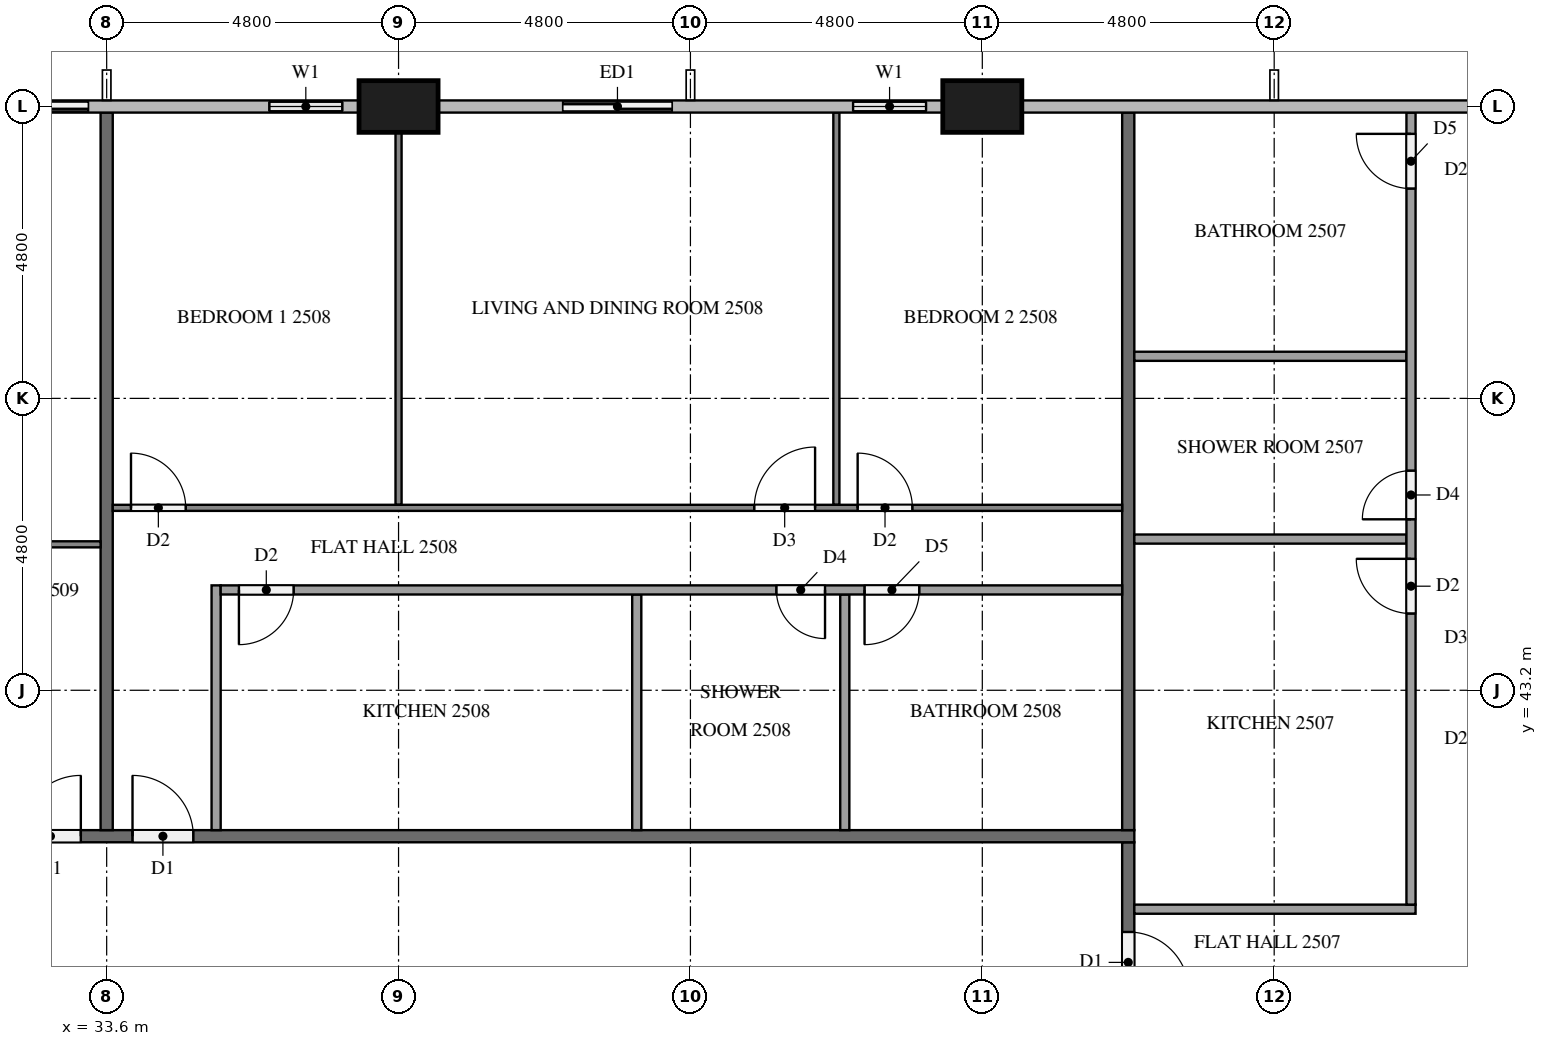
"""IFC4 building model, lengths in metres.
Left out: names, types, materials, properties, quantities, classifications, styles, units other than length and angle.
Written with IfcOpenShell. Run it as: python <this file> out.ifc"""

import sys

from ifc_helpers import new_model, si_unit, direction, frame, frame_2d, origin, origin_2d, place, context, subcontext, project, spatial, rectangle, extrude, element, fill, save


model = new_model("IFC4")
c1 = context("Model", 3, precision=1e-05, world=origin(), true_north=direction((0.0, 1.0)))
c2 = subcontext(c1, "Body", "Model", "MODEL_VIEW")
j1 = project(units=[si_unit("LENGTHUNIT", "METRE"), si_unit("PLANEANGLEUNIT", "RADIAN")], contexts=[c1])
p1 = place(None, origin())
s1 = spatial("IfcSite", under=j1, at=p1, CompositionType="ELEMENT")
p2 = place(p1, origin())
s2 = spatial("IfcBuilding", under=s1, at=p2, CompositionType="ELEMENT")
p3 = place(p2, frame((0.0, 0.0, 99.7)))
s3 = spatial("IfcBuildingStorey", under=s2, at=p3, CompositionType="ELEMENT", Elevation=99.7)
for number, where, z_axis, x_axis in (
    (1, (48.0, 52.8, 0.0), (0.0, 0.0, 1.0), (1.0, 0.0, 0.0)),
    (2, (38.4, 52.8, 0.0), (0.0, 0.0, 1.0), (1.0, 0.0, 0.0)),
):
    element("IfcColumn", number, at=place(p3, frame(where, z_axis=z_axis, x_axis=x_axis)), inside=s3, PredefinedType="COLUMN", context=c2, shape_type="SweptSolid", body=[
        extrude(rectangle(XDim=1.3, YDim=0.85, at=origin_2d()), origin(), (0.0, 0.0, 1.0), 3.2),
    ])
p4 = place(p3, frame((47.35, 52.8, 0.0), z_axis=(0.0, 0.0, 1.0), x_axis=(-1.0, 0.0, 0.0)))
e3 = element("IfcWall", 3, at=p4, inside=s3, PredefinedType="SOLIDWALL", context=c2, shape_type="SweptSolid", body=[
    extrude(rectangle(XDim=1.75, YDim=0.15, at=frame_2d((0.875, 0.0))), origin(), (0.0, 0.0, 1.0), 3.2),
])
p5 = place(p4, frame((0.275, 0.0, 0.9)))
e4 = element("IfcOpeningElement", 4, at=p5, cuts=e3, PredefinedType="OPENING", context=c2, shape_type="SweptSolid", body=[
    extrude(rectangle(XDim=1.2, YDim=1.4, at=frame_2d((0.6, 0.7))), frame((0.0, 0.085, 0.0), z_axis=(0.0, -1.0, 0.0), x_axis=(1.0, 0.0, 0.0)), (0.0, 0.0, 1.0), 0.17),
])
p6 = place(p3, frame((43.2, 52.8, 0.0), z_axis=(0.0, 0.0, 1.0), x_axis=(-1.0, 0.0, 0.0)))
e5 = element("IfcWall", 5, at=p6, inside=s3, PredefinedType="SOLIDWALL", context=c2, shape_type="SweptSolid", body=[
    extrude(rectangle(XDim=2.4, YDim=0.15, at=frame_2d((1.2, 0.0))), origin(), (0.0, 0.0, 1.0), 3.2),
])
p7 = place(p6, frame((0.3, 0.0, 0.0)))
e6 = element("IfcOpeningElement", 6, at=p7, cuts=e5, PredefinedType="OPENING", context=c2, shape_type="SweptSolid", body=[
    extrude(rectangle(XDim=1.8, YDim=2.4, at=frame_2d((0.9, 1.2))), frame((0.0, 0.085, 0.0), z_axis=(0.0, -1.0, 0.0), x_axis=(1.0, 0.0, 0.0)), (0.0, 0.0, 1.0), 0.17),
])
p8 = place(p3, frame((37.75, 52.8, 0.0), z_axis=(0.0, 0.0, 1.0), x_axis=(-1.0, 0.0, 0.0)))
e7 = element("IfcWall", 7, at=p8, inside=s3, PredefinedType="SOLIDWALL", context=c2, shape_type="SweptSolid", body=[
    extrude(rectangle(XDim=1.75, YDim=0.15, at=frame_2d((0.875, 0.0))), origin(), (0.0, 0.0, 1.0), 3.2),
])
p9 = place(p8, frame((0.275, 0.0, 0.9)))
e8 = element("IfcOpeningElement", 8, at=p9, cuts=e7, PredefinedType="OPENING", context=c2, shape_type="SweptSolid", body=[
    extrude(rectangle(XDim=1.2, YDim=1.4, at=frame_2d((0.6, 0.7))), frame((0.0, 0.085, 0.0), z_axis=(0.0, -1.0, 0.0), x_axis=(1.0, 0.0, 0.0)), (0.0, 0.0, 1.0), 0.17),
])
p10 = place(p3, frame((33.6, 52.8, 0.0), z_axis=(0.0, 0.0, 1.0), x_axis=(-1.0, 0.0, 0.0)))
e9 = element("IfcWall", 9, at=p10, inside=s3, PredefinedType="SOLIDWALL", context=c2, shape_type="SweptSolid", body=[
    extrude(rectangle(XDim=2.4, YDim=0.15, at=frame_2d((1.2, 0.0))), origin(), (0.0, 0.0, 1.0), 3.2),
])
p11 = place(p10, frame((0.3, 0.0, 0.0)))
e10 = element("IfcOpeningElement", 10, at=p11, cuts=e9, PredefinedType="OPENING", context=c2, shape_type="SweptSolid", body=[
    extrude(rectangle(XDim=1.8, YDim=2.4, at=frame_2d((0.9, 1.2))), frame((0.0, 0.085, 0.0), z_axis=(0.0, -1.0, 0.0), x_axis=(1.0, 0.0, 0.0)), (0.0, 0.0, 1.0), 0.17),
])
p12 = place(p3, frame((50.4, 40.7, 0.0), z_axis=(0.0, 0.0, 1.0), x_axis=(0.0, -1.0, 0.0)))
e11 = element("IfcWall", 11, at=p12, inside=s3, PredefinedType="PARTITIONING", context=c2, shape_type="SweptSolid", body=[
    extrude(rectangle(XDim=2.8, YDim=0.2, at=frame_2d((1.4, 0.0))), origin(), (0.0, 0.0, 1.0), 3.2),
])
p13 = place(p12, frame((1.475, 0.0, 0.0)))
e12 = element("IfcOpeningElement", 12, at=p13, cuts=e11, PredefinedType="OPENING", context=c2, shape_type="SweptSolid", body=[
    extrude(rectangle(XDim=1.0, YDim=2.1, at=frame_2d((0.5, 1.05))), frame((0.0, 0.11, 0.0), z_axis=(0.0, -1.0, 0.0), x_axis=(1.0, 0.0, 0.0)), (0.0, 0.0, 1.0), 0.22),
])
p14 = place(p3, frame((11.9, 40.8, 0.0), z_axis=(0.0, 0.0, 1.0), x_axis=(1.0, 0.0, 0.0)))
e13 = element("IfcWall", 13, at=p14, inside=s3, PredefinedType="PARTITIONING", context=c2, shape_type="SweptSolid", body=[
    extrude(rectangle(XDim=38.6, YDim=0.2, at=frame_2d((19.3, 0.0))), origin(), (0.0, 0.0, 1.0), 3.2),
])
p15 = place(p14, frame((22.125, 0.0, 0.0)))
e14 = element("IfcOpeningElement", 14, at=p15, cuts=e13, PredefinedType="OPENING", context=c2, shape_type="SweptSolid", body=[
    extrude(rectangle(XDim=1.0, YDim=2.1, at=frame_2d((0.5, 1.05))), frame((0.0, 0.11, 0.0), z_axis=(0.0, -1.0, 0.0), x_axis=(1.0, 0.0, 0.0)), (0.0, 0.0, 1.0), 0.22),
])
p16 = place(p14, frame((20.275, 0.0, 0.0)))
e15 = element("IfcOpeningElement", 15, at=p16, cuts=e13, PredefinedType="OPENING", context=c2, shape_type="SweptSolid", body=[
    extrude(rectangle(XDim=1.0, YDim=2.1, at=frame_2d((0.5, 1.05))), frame((0.0, 0.11, 0.0), z_axis=(0.0, -1.0, 0.0), x_axis=(1.0, 0.0, 0.0)), (0.0, 0.0, 1.0), 0.22),
])
p17 = place(p14, frame((0.525, 0.0, 0.0)))
e16 = element("IfcOpeningElement", 16, at=p17, cuts=e13, PredefinedType="OPENING", context=c2, shape_type="SweptSolid", body=[
    extrude(rectangle(XDim=1.0, YDim=2.1, at=frame_2d((0.5, 1.05))), frame((0.0, 0.11, 0.0), z_axis=(0.0, -1.0, 0.0), x_axis=(1.0, 0.0, 0.0)), (0.0, 0.0, 1.0), 0.22),
])
for number, where, z_axis, x_axis in (
    (17, (50.4, 40.9, 0.0), (0.0, 0.0, 1.0), (0.0, 1.0, 0.0)),
    (18, (33.6, 52.7, 0.0), (0.0, 0.0, 1.0), (0.0, -1.0, 0.0)),
):
    element("IfcWall", number, at=place(p3, frame(where, z_axis=z_axis, x_axis=x_axis)), inside=s3, PredefinedType="PARTITIONING", context=c2, shape_type="SweptSolid", body=[
        extrude(rectangle(XDim=11.8, YDim=0.2, at=frame_2d((5.9, 0.0))), origin(), (0.0, 0.0, 1.0), 3.2),
    ])
for number, where, z_axis, x_axis in (
    (19, (50.5, 45.687, 0.0), (0.0, 0.0, 1.0), (1.0, 0.0, 0.0)),
    (20, (50.5, 48.692, 0.0), (0.0, 0.0, 1.0), (1.0, 0.0, 0.0)),
):
    element("IfcWall", number, at=place(p3, frame(where, z_axis=z_axis, x_axis=x_axis)), inside=s3, PredefinedType="PARTITIONING", context=c2, shape_type="SweptSolid", body=[
        extrude(rectangle(XDim=4.475, YDim=0.15, at=frame_2d((2.238, 0.0))), origin(), (0.0, 0.0, 1.0), 3.2),
    ])
p18 = place(p3, frame((50.5, 39.6, 0.0), z_axis=(0.0, 0.0, 1.0), x_axis=(1.0, 0.0, 0.0)))
e21 = element("IfcWall", 21, at=p18, inside=s3, PredefinedType="PARTITIONING", context=c2, shape_type="SweptSolid", body=[
    extrude(rectangle(XDim=4.625, YDim=0.15, at=frame_2d((2.312, 0.0))), origin(), (0.0, 0.0, 1.0), 3.2),
])
p19 = place(p3, frame((55.05, 39.675, 0.0), z_axis=(0.0, 0.0, 1.0), x_axis=(0.0, 1.0, 0.0)))
e22 = element("IfcWall", 22, at=p19, inside=s3, PredefinedType="PARTITIONING", context=c2, shape_type="SweptSolid", body=[
    extrude(rectangle(XDim=13.025, YDim=0.15, at=frame_2d((6.512, 0.0))), origin(), (0.0, 0.0, 1.0), 3.2),
])
p20 = place(p19, frame((4.787, 0.0, 0.0)))
e23 = element("IfcOpeningElement", 23, at=p20, cuts=e22, PredefinedType="OPENING", context=c2, shape_type="SweptSolid", body=[
    extrude(rectangle(XDim=0.9, YDim=2.1, at=frame_2d((0.45, 1.05))), frame((0.0, 0.085, 0.0), z_axis=(0.0, -1.0, 0.0), x_axis=(1.0, 0.0, 0.0)), (0.0, 0.0, 1.0), 0.17),
])
p21 = place(p19, frame((6.336, 0.0, 0.0)))
e24 = element("IfcOpeningElement", 24, at=p21, cuts=e22, PredefinedType="OPENING", context=c2, shape_type="SweptSolid", body=[
    extrude(rectangle(XDim=0.8, YDim=2.1, at=frame_2d((0.4, 1.05))), frame((0.0, 0.085, 0.0), z_axis=(0.0, -1.0, 0.0), x_axis=(1.0, 0.0, 0.0)), (0.0, 0.0, 1.0), 0.17),
])
p22 = place(p19, frame((11.775, 0.0, 0.0)))
e25 = element("IfcOpeningElement", 25, at=p22, cuts=e22, PredefinedType="OPENING", context=c2, shape_type="SweptSolid", body=[
    extrude(rectangle(XDim=0.9, YDim=2.1, at=frame_2d((0.45, 1.05))), frame((0.0, 0.085, 0.0), z_axis=(0.0, -1.0, 0.0), x_axis=(1.0, 0.0, 0.0)), (0.0, 0.0, 1.0), 0.17),
])
p23 = place(p3, frame((38.4, 46.25, 0.0), z_axis=(0.0, 0.0, 1.0), x_axis=(0.0, 1.0, 0.0)))
e26 = element("IfcWall", 26, at=p23, inside=s3, PredefinedType="PARTITIONING", context=c2, shape_type="SweptSolid", body=[
    extrude(rectangle(XDim=6.125, YDim=0.1, at=frame_2d((3.062, 0.0))), origin(), (0.0, 0.0, 1.0), 3.2),
])
p24 = place(p3, frame((45.6, 46.25, 0.0), z_axis=(0.0, 0.0, 1.0), x_axis=(0.0, 1.0, 0.0)))
e27 = element("IfcWall", 27, at=p24, inside=s3, PredefinedType="PARTITIONING", context=c2, shape_type="SweptSolid", body=[
    extrude(rectangle(XDim=6.45, YDim=0.1, at=frame_2d((3.225, 0.0))), origin(), (0.0, 0.0, 1.0), 3.2),
])
p25 = place(p3, frame((33.7, 46.2, 0.0), z_axis=(0.0, 0.0, 1.0), x_axis=(1.0, 0.0, 0.0)))
e28 = element("IfcWall", 28, at=p25, inside=s3, PredefinedType="PARTITIONING", context=c2, shape_type="SweptSolid", body=[
    extrude(rectangle(XDim=16.6, YDim=0.1, at=frame_2d((8.3, 0.0))), origin(), (0.0, 0.0, 1.0), 3.2),
])
p26 = place(p25, frame((0.3, 0.0, 0.0)))
e29 = element("IfcOpeningElement", 29, at=p26, cuts=e28, PredefinedType="OPENING", context=c2, shape_type="SweptSolid", body=[
    extrude(rectangle(XDim=0.9, YDim=2.1, at=frame_2d((0.45, 1.05))), frame((0.0, 0.06, 0.0), z_axis=(0.0, -1.0, 0.0), x_axis=(1.0, 0.0, 0.0)), (0.0, 0.0, 1.0), 0.12),
])
p27 = place(p25, frame((10.55, 0.0, 0.0)))
e30 = element("IfcOpeningElement", 30, at=p27, cuts=e28, PredefinedType="OPENING", context=c2, shape_type="SweptSolid", body=[
    extrude(rectangle(XDim=1.0, YDim=2.1, at=frame_2d((0.5, 1.05))), frame((0.0, 0.06, 0.0), z_axis=(0.0, -1.0, 0.0), x_axis=(1.0, 0.0, 0.0)), (0.0, 0.0, 1.0), 0.12),
])
p28 = place(p25, frame((12.25, 0.0, 0.0)))
e31 = element("IfcOpeningElement", 31, at=p28, cuts=e28, PredefinedType="OPENING", context=c2, shape_type="SweptSolid", body=[
    extrude(rectangle(XDim=0.9, YDim=2.1, at=frame_2d((0.45, 1.05))), frame((0.0, 0.06, 0.0), z_axis=(0.0, -1.0, 0.0), x_axis=(1.0, 0.0, 0.0)), (0.0, 0.0, 1.0), 0.12),
])
for number, where, z_axis, x_axis in (
    (32, (42.317, 40.9, 0.0), (0.0, 0.0, 1.0), (0.0, 1.0, 0.0)),
    (33, (45.739, 40.9, 0.0), (0.0, 0.0, 1.0), (0.0, 1.0, 0.0)),
):
    element("IfcWall", number, at=place(p3, frame(where, z_axis=z_axis, x_axis=x_axis)), inside=s3, PredefinedType="PARTITIONING", context=c2, shape_type="SweptSolid", body=[
        extrude(rectangle(XDim=3.875, YDim=0.15, at=frame_2d((1.938, 0.0))), origin(), (0.0, 0.0, 1.0), 3.2),
    ])
p29 = place(p3, frame((35.4, 40.9, 0.0), z_axis=(0.0, 0.0, 1.0), x_axis=(0.0, 1.0, 0.0)))
e34 = element("IfcWall", 34, at=p29, inside=s3, PredefinedType="PARTITIONING", context=c2, shape_type="SweptSolid", body=[
    extrude(rectangle(XDim=4.025, YDim=0.15, at=frame_2d((2.013, 0.0))), origin(), (0.0, 0.0, 1.0), 3.2),
])
p30 = place(p3, frame((50.3, 44.85, 0.0), z_axis=(0.0, 0.0, 1.0), x_axis=(-1.0, 0.0, 0.0)))
e35 = element("IfcWall", 35, at=p30, inside=s3, PredefinedType="PARTITIONING", context=c2, shape_type="SweptSolid", body=[
    extrude(rectangle(XDim=14.825, YDim=0.15, at=frame_2d((7.413, 0.0))), origin(), (0.0, 0.0, 1.0), 3.2),
])
p31 = place(p30, frame((13.625, 0.0, 0.0)))
e36 = element("IfcOpeningElement", 36, at=p31, cuts=e35, PredefinedType="OPENING", context=c2, shape_type="SweptSolid", body=[
    extrude(rectangle(XDim=0.9, YDim=2.1, at=frame_2d((0.45, 1.05))), frame((0.0, 0.085, 0.0), z_axis=(0.0, -1.0, 0.0), x_axis=(1.0, 0.0, 0.0)), (0.0, 0.0, 1.0), 0.17),
])
p32 = place(p30, frame((4.886, 0.0, 0.0)))
e37 = element("IfcOpeningElement", 37, at=p32, cuts=e35, PredefinedType="OPENING", context=c2, shape_type="SweptSolid", body=[
    extrude(rectangle(XDim=0.8, YDim=2.1, at=frame_2d((0.4, 1.05))), frame((0.0, 0.085, 0.0), z_axis=(0.0, -1.0, 0.0), x_axis=(1.0, 0.0, 0.0)), (0.0, 0.0, 1.0), 0.17),
])
p33 = place(p30, frame((3.336, 0.0, 0.0)))
e38 = element("IfcOpeningElement", 38, at=p33, cuts=e35, PredefinedType="OPENING", context=c2, shape_type="SweptSolid", body=[
    extrude(rectangle(XDim=0.9, YDim=2.1, at=frame_2d((0.45, 1.05))), frame((0.0, 0.085, 0.0), z_axis=(0.0, -1.0, 0.0), x_axis=(1.0, 0.0, 0.0)), (0.0, 0.0, 1.0), 0.17),
])
p34 = place(p3, frame((21.7, 45.6, 0.0), z_axis=(0.0, 0.0, 1.0), x_axis=(1.0, 0.0, 0.0)))
e39 = element("IfcWall", 39, at=p34, inside=s3, PredefinedType="PARTITIONING", context=c2, shape_type="SweptSolid", body=[
    extrude(rectangle(XDim=11.8, YDim=0.1, at=frame_2d((5.9, 0.0))), origin(), (0.0, 0.0, 1.0), 3.2),
])
p35 = place(p34, frame((5.05, 0.0, 0.0)))
e40 = element("IfcOpeningElement", 40, at=p35, cuts=e39, PredefinedType="OPENING", context=c2, shape_type="SweptSolid", body=[
    extrude(rectangle(XDim=1.0, YDim=2.1, at=frame_2d((0.5, 1.05))), frame((0.0, 0.06, 0.0), z_axis=(0.0, -1.0, 0.0), x_axis=(1.0, 0.0, 0.0)), (0.0, 0.0, 1.0), 0.12),
])
p36 = place(p34, frame((3.45, 0.0, 0.0)))
e41 = element("IfcOpeningElement", 41, at=p36, cuts=e39, PredefinedType="OPENING", context=c2, shape_type="SweptSolid", body=[
    extrude(rectangle(XDim=0.9, YDim=2.1, at=frame_2d((0.45, 1.05))), frame((0.0, 0.06, 0.0), z_axis=(0.0, -1.0, 0.0), x_axis=(1.0, 0.0, 0.0)), (0.0, 0.0, 1.0), 0.12),
])
p37 = place(p5, origin())
e42 = element("IfcWindow", 42, at=p37, inside=s3, PartitioningType="SINGLE_PANEL", PredefinedType="WINDOW", context=c2, shape_type="SweptSolid", body=[
    extrude(rectangle(XDim=1.2, YDim=1.4, at=frame_2d((0.6, 0.7))), frame((0.0, 0.03, 0.0), z_axis=(0.0, -1.0, 0.0), x_axis=(1.0, 0.0, 0.0)), (0.0, 0.0, 1.0), 0.06),
])
fill(e4, e42)
p38 = place(p7, origin())
e43 = element("IfcDoor", 43, at=p38, inside=s3, OperationType="SLIDING_TO_RIGHT", PredefinedType="DOOR", context=c2, shape_type="SweptSolid", body=[
    extrude(rectangle(XDim=1.8, YDim=2.4, at=frame_2d((0.9, 1.2))), frame((0.0, 0.025, 0.0), z_axis=(0.0, -1.0, 0.0), x_axis=(1.0, 0.0, 0.0)), (0.0, 0.0, 1.0), 0.05),
])
fill(e6, e43)
p39 = place(p9, origin())
e44 = element("IfcWindow", 44, at=p39, inside=s3, PartitioningType="SINGLE_PANEL", PredefinedType="WINDOW", context=c2, shape_type="SweptSolid", body=[
    extrude(rectangle(XDim=1.2, YDim=1.4, at=frame_2d((0.6, 0.7))), frame((0.0, 0.03, 0.0), z_axis=(0.0, -1.0, 0.0), x_axis=(1.0, 0.0, 0.0)), (0.0, 0.0, 1.0), 0.06),
])
fill(e8, e44)
p40 = place(p11, origin())
e45 = element("IfcDoor", 45, at=p40, inside=s3, OperationType="SLIDING_TO_LEFT", PredefinedType="DOOR", context=c2, shape_type="SweptSolid", body=[
    extrude(rectangle(XDim=1.8, YDim=2.4, at=frame_2d((0.9, 1.2))), frame((0.0, 0.025, 0.0), z_axis=(0.0, -1.0, 0.0), x_axis=(1.0, 0.0, 0.0)), (0.0, 0.0, 1.0), 0.05),
])
fill(e10, e45)
p41 = place(p13, origin())
e46 = element("IfcDoor", 46, at=p41, inside=s3, OperationType="SINGLE_SWING_RIGHT", PredefinedType="DOOR", context=c2, shape_type="SweptSolid", body=[
    extrude(rectangle(XDim=1.0, YDim=2.1, at=frame_2d((0.5, 1.05))), frame((0.0, 0.025, 0.0), z_axis=(0.0, -1.0, 0.0), x_axis=(1.0, 0.0, 0.0)), (0.0, 0.0, 1.0), 0.05),
])
fill(e12, e46)
p42 = place(p15, origin())
e47 = element("IfcDoor", 47, at=p42, inside=s3, OperationType="SINGLE_SWING_LEFT", PredefinedType="DOOR", context=c2, shape_type="SweptSolid", body=[
    extrude(rectangle(XDim=1.0, YDim=2.1, at=frame_2d((0.5, 1.05))), frame((0.0, 0.025, 0.0), z_axis=(0.0, -1.0, 0.0), x_axis=(1.0, 0.0, 0.0)), (0.0, 0.0, 1.0), 0.05),
])
fill(e14, e47)
p43 = place(p16, origin())
e48 = element("IfcDoor", 48, at=p43, inside=s3, OperationType="SINGLE_SWING_RIGHT", PredefinedType="DOOR", context=c2, shape_type="SweptSolid", body=[
    extrude(rectangle(XDim=1.0, YDim=2.1, at=frame_2d((0.5, 1.05))), frame((0.0, 0.025, 0.0), z_axis=(0.0, -1.0, 0.0), x_axis=(1.0, 0.0, 0.0)), (0.0, 0.0, 1.0), 0.05),
])
fill(e15, e48)
p44 = place(p20, origin())
e49 = element("IfcDoor", 49, at=p44, inside=s3, OperationType="SINGLE_SWING_RIGHT", PredefinedType="DOOR", context=c2, shape_type="SweptSolid", body=[
    extrude(rectangle(XDim=0.9, YDim=2.1, at=frame_2d((0.45, 1.05))), frame((0.0, 0.025, 0.0), z_axis=(0.0, -1.0, 0.0), x_axis=(1.0, 0.0, 0.0)), (0.0, 0.0, 1.0), 0.05),
])
fill(e23, e49)
p45 = place(p21, origin())
e50 = element("IfcDoor", 50, at=p45, inside=s3, OperationType="SINGLE_SWING_LEFT", PredefinedType="DOOR", context=c2, shape_type="SweptSolid", body=[
    extrude(rectangle(XDim=0.8, YDim=2.1, at=frame_2d((0.4, 1.05))), frame((0.0, 0.025, 0.0), z_axis=(0.0, -1.0, 0.0), x_axis=(1.0, 0.0, 0.0)), (0.0, 0.0, 1.0), 0.05),
])
fill(e24, e50)
p46 = place(p22, origin())
e51 = element("IfcDoor", 51, at=p46, inside=s3, OperationType="SINGLE_SWING_RIGHT", PredefinedType="DOOR", context=c2, shape_type="SweptSolid", body=[
    extrude(rectangle(XDim=0.9, YDim=2.1, at=frame_2d((0.45, 1.05))), frame((0.0, 0.025, 0.0), z_axis=(0.0, -1.0, 0.0), x_axis=(1.0, 0.0, 0.0)), (0.0, 0.0, 1.0), 0.05),
])
fill(e25, e51)
p47 = place(p26, origin())
e52 = element("IfcDoor", 52, at=p47, inside=s3, OperationType="SINGLE_SWING_LEFT", PredefinedType="DOOR", context=c2, shape_type="SweptSolid", body=[
    extrude(rectangle(XDim=0.9, YDim=2.1, at=frame_2d((0.45, 1.05))), frame((0.0, 0.025, 0.0), z_axis=(0.0, -1.0, 0.0), x_axis=(1.0, 0.0, 0.0)), (0.0, 0.0, 1.0), 0.05),
])
fill(e29, e52)
p48 = place(p27, origin())
e53 = element("IfcDoor", 53, at=p48, inside=s3, OperationType="SINGLE_SWING_RIGHT", PredefinedType="DOOR", context=c2, shape_type="SweptSolid", body=[
    extrude(rectangle(XDim=1.0, YDim=2.1, at=frame_2d((0.5, 1.05))), frame((0.0, 0.025, 0.0), z_axis=(0.0, -1.0, 0.0), x_axis=(1.0, 0.0, 0.0)), (0.0, 0.0, 1.0), 0.05),
])
fill(e30, e53)
p49 = place(p28, origin())
e54 = element("IfcDoor", 54, at=p49, inside=s3, OperationType="SINGLE_SWING_LEFT", PredefinedType="DOOR", context=c2, shape_type="SweptSolid", body=[
    extrude(rectangle(XDim=0.9, YDim=2.1, at=frame_2d((0.45, 1.05))), frame((0.0, 0.025, 0.0), z_axis=(0.0, -1.0, 0.0), x_axis=(1.0, 0.0, 0.0)), (0.0, 0.0, 1.0), 0.05),
])
fill(e31, e54)
p50 = place(p31, origin())
e55 = element("IfcDoor", 55, at=p50, inside=s3, OperationType="SINGLE_SWING_RIGHT", PredefinedType="DOOR", context=c2, shape_type="SweptSolid", body=[
    extrude(rectangle(XDim=0.9, YDim=2.1, at=frame_2d((0.45, 1.05))), frame((0.0, 0.025, 0.0), z_axis=(0.0, -1.0, 0.0), x_axis=(1.0, 0.0, 0.0)), (0.0, 0.0, 1.0), 0.05),
])
fill(e36, e55)
p51 = place(p32, origin())
e56 = element("IfcDoor", 56, at=p51, inside=s3, OperationType="SINGLE_SWING_LEFT", PredefinedType="DOOR", context=c2, shape_type="SweptSolid", body=[
    extrude(rectangle(XDim=0.8, YDim=2.1, at=frame_2d((0.4, 1.05))), frame((0.0, 0.025, 0.0), z_axis=(0.0, -1.0, 0.0), x_axis=(1.0, 0.0, 0.0)), (0.0, 0.0, 1.0), 0.05),
])
fill(e37, e56)
p52 = place(p33, origin())
e57 = element("IfcDoor", 57, at=p52, inside=s3, OperationType="SINGLE_SWING_RIGHT", PredefinedType="DOOR", context=c2, shape_type="SweptSolid", body=[
    extrude(rectangle(XDim=0.9, YDim=2.1, at=frame_2d((0.45, 1.05))), frame((0.0, 0.025, 0.0), z_axis=(0.0, -1.0, 0.0), x_axis=(1.0, 0.0, 0.0)), (0.0, 0.0, 1.0), 0.05),
])
fill(e38, e57)
save(model, sys.argv[1])
